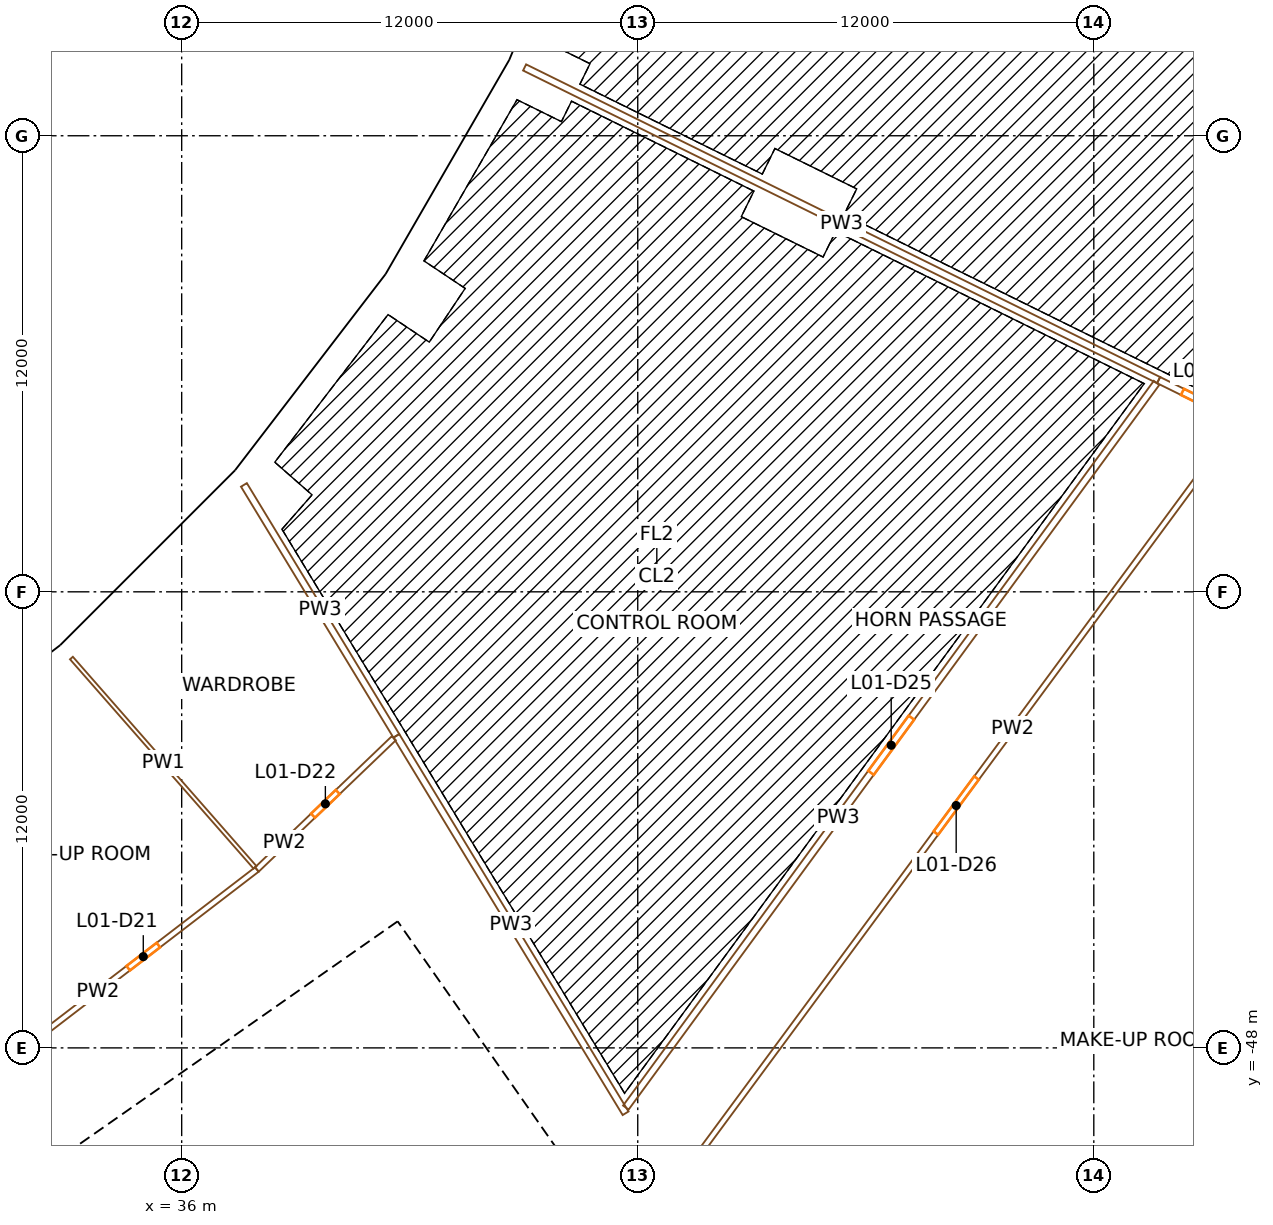
"""IFC4 building model, lengths in metres.
Left out: names, types, materials, properties, quantities, classifications, styles, units other than length and angle.
Written with IfcOpenShell. Run it as: python <this file> out.ifc"""

import sys

from ifc_helpers import new_model, si_unit, direction, frame, frame_2d, origin, origin_2d, place, context, subcontext, project, spatial, rectangle, extrude, element, fill, save


model = new_model("IFC4")
c1 = context("Model", 3, precision=1e-05, world=origin(), true_north=direction((0.0, 1.0)))
c2 = subcontext(c1, "Body", "Model", "MODEL_VIEW")
j1 = project(units=[si_unit("LENGTHUNIT", "METRE"), si_unit("PLANEANGLEUNIT", "RADIAN")], contexts=[c1])
p1 = place(None, origin())
s1 = spatial("IfcSite", under=j1, at=p1, CompositionType="ELEMENT")
p2 = place(p1, origin())
s2 = spatial("IfcBuilding", under=s1, at=p2, CompositionType="ELEMENT")
p3 = place(p2, frame((0.0, 0.0, 9.0)))
s3 = spatial("IfcBuildingStorey", under=s2, at=p3, CompositionType="ELEMENT", Elevation=9.0)
p4 = place(p3, frame((32.362, -48.433, 0.0), z_axis=(0.0, 0.0, 1.0), x_axis=(0.831469612303, 0.55557023302, 0.0)))
e1 = element("IfcColumn", 1, at=p4, inside=s3, PredefinedType="COLUMN", context=c2, shape_type="SweptSolid", body=[
    extrude(rectangle(XDim=1.4, YDim=1.8, at=origin_2d()), origin(), (0.0, 0.0, 1.0), 9.0),
])
p5 = place(p3, frame((33.462, -38.156, 0.0), z_axis=(0.0, 0.0, 1.0), x_axis=(0.751839807479, 0.6593458151, 0.0)))
e2 = element("IfcColumn", 2, at=p5, inside=s3, PredefinedType="COLUMN", context=c2, shape_type="SweptSolid", body=[
    extrude(rectangle(XDim=1.1, YDim=1.3, at=origin_2d()), origin(), (0.0, 0.0, 1.0), 9.0),
])
p6 = place(p3, frame((38.407, -43.795, 0.0), z_axis=(0.0, 0.0, 1.0), x_axis=(0.751839807479, 0.6593458151, 0.0)))
e3 = element("IfcColumn", 3, at=p6, inside=s3, PredefinedType="COLUMN", context=c2, shape_type="SweptSolid", body=[
    extrude(rectangle(XDim=1.4, YDim=1.8, at=origin_2d()), origin(), (0.0, 0.0, 1.0), 9.0),
])
p7 = place(p3, frame((38.156, -33.462, 0.0), z_axis=(0.0, 0.0, 1.0), x_axis=(0.6593458151, 0.751839807479, 0.0)))
e4 = element("IfcColumn", 4, at=p7, inside=s3, PredefinedType="COLUMN", context=c2, shape_type="SweptSolid", body=[
    extrude(rectangle(XDim=1.1, YDim=1.3, at=origin_2d()), origin(), (0.0, 0.0, 1.0), 9.0),
])
for number, where, z_axis, x_axis in (
    (5, (43.795, -38.407, 0.0), (0.0, 0.0, 1.0), (0.659, 0.752, 0.0)),
    (6, (58.456, -51.264, 0.0), (0.0, 0.0, 1.0), (0.659, 0.752, 0.0)),
):
    element("IfcColumn", number, at=place(p3, frame(where, z_axis=z_axis, x_axis=x_axis)), inside=s3, PredefinedType="COLUMN", context=c2, shape_type="SweptSolid", body=[
        extrude(rectangle(XDim=1.4, YDim=1.8, at=origin_2d()), origin(), (0.0, 0.0, 1.0), 9.0),
    ])
p8 = place(p3, frame((42.197, -28.195, 0.0), z_axis=(0.0, 0.0, 1.0), x_axis=(0.55557023302, 0.831469612303, 0.0)))
e7 = element("IfcColumn", 7, at=p8, inside=s3, PredefinedType="COLUMN", context=c2, shape_type="SweptSolid", body=[
    extrude(rectangle(XDim=1.1, YDim=1.3, at=origin_2d()), origin(), (0.0, 0.0, 1.0), 9.0),
])
p9 = place(p3, frame((48.433, -32.362, 0.0), z_axis=(0.0, 0.0, 1.0), x_axis=(0.55557023302, 0.831469612303, 0.0)))
e8 = element("IfcColumn", 8, at=p9, inside=s3, PredefinedType="COLUMN", context=c2, shape_type="SweptSolid", body=[
    extrude(rectangle(XDim=1.4, YDim=1.8, at=origin_2d()), origin(), (0.0, 0.0, 1.0), 9.0),
])
p10 = place(p3, frame((45.516, -22.446, 0.0), z_axis=(0.0, 0.0, 1.0), x_axis=(0.442288690219, 0.896872741533, 0.0)))
e9 = element("IfcColumn", 9, at=p10, inside=s3, PredefinedType="COLUMN", context=c2, shape_type="SweptSolid", body=[
    extrude(rectangle(XDim=1.1, YDim=1.3, at=origin_2d()), origin(), (0.0, 0.0, 1.0), 9.0),
])
p11 = place(p3, frame((52.243, -25.763, 0.0), z_axis=(0.0, 0.0, 1.0), x_axis=(0.442288690219, 0.896872741533, 0.0)))
e10 = element("IfcColumn", 10, at=p11, inside=s3, PredefinedType="COLUMN", context=c2, shape_type="SweptSolid", body=[
    extrude(rectangle(XDim=1.4, YDim=1.8, at=origin_2d()), origin(), (0.0, 0.0, 1.0), 9.0),
])
p12 = place(p3, frame((49.779, -57.191, 0.0), z_axis=(0.0, 0.0, 1.0), x_axis=(-0.573577477574, 0.819151315216, 0.0)))
e11 = element("IfcWall", 11, at=p12, inside=s3, PredefinedType="SHEAR", context=c2, shape_type="SweptSolid", body=[
    extrude(rectangle(XDim=14.8, YDim=0.9, at=frame_2d((7.4, 0.0))), origin(), (0.0, 0.0, 1.0), 8.6),
])
p13 = place(p12, frame((6.7, 0.0, 0.0)))
e12 = element("IfcOpeningElement", 12, at=p13, cuts=e11, PredefinedType="OPENING", context=c2, shape_type="SweptSolid", body=[
    extrude(rectangle(XDim=1.4, YDim=2.1, at=frame_2d((0.7, 1.05))), frame((0.0, 0.46, 0.0), z_axis=(0.0, -1.0, 0.0), x_axis=(1.0, 0.0, 0.0)), (0.0, 0.0, 1.0), 0.92),
])
p14 = place(p3, frame((28.854, -54.324, 0.0), z_axis=(0.0, 0.0, 1.0), x_axis=(0.819145767589, 0.573585400304, 0.0)))
e13 = element("IfcWall", 13, at=p14, inside=s3, PredefinedType="SHEAR", context=c2, shape_type="SweptSolid", body=[
    extrude(rectangle(XDim=15.045, YDim=0.9, at=frame_2d((7.523, 0.0))), origin(), (0.0, 0.0, 1.0), 8.6),
])
p15 = place(p14, frame((0.85, 0.0, 0.0)))
e14 = element("IfcOpeningElement", 14, at=p15, cuts=e13, PredefinedType="OPENING", context=c2, shape_type="SweptSolid", body=[
    extrude(rectangle(XDim=1.0, YDim=2.1, at=frame_2d((0.5, 1.05))), frame((0.0, 0.46, 0.0), z_axis=(0.0, -1.0, 0.0), x_axis=(1.0, 0.0, 0.0)), (0.0, 0.0, 1.0), 0.92),
])
p16 = place(p14, frame((3.575, 0.0, 0.0)))
e15 = element("IfcOpeningElement", 15, at=p16, cuts=e13, PredefinedType="OPENING", context=c2, shape_type="SweptSolid", body=[
    extrude(rectangle(XDim=1.0, YDim=2.1, at=frame_2d((0.5, 1.05))), frame((0.0, 0.46, 0.0), z_axis=(0.0, -1.0, 0.0), x_axis=(1.0, 0.0, 0.0)), (0.0, 0.0, 1.0), 0.92),
])
p17 = place(p14, frame((6.275, 0.0, 0.0)))
e16 = element("IfcOpeningElement", 16, at=p17, cuts=e13, PredefinedType="OPENING", context=c2, shape_type="SweptSolid", body=[
    extrude(rectangle(XDim=0.9, YDim=2.1, at=frame_2d((0.45, 1.05))), frame((0.0, 0.46, 0.0), z_axis=(0.0, -1.0, 0.0), x_axis=(1.0, 0.0, 0.0)), (0.0, 0.0, 1.0), 0.92),
])
p18 = place(p14, frame((13.495, 0.0, 0.0)))
e17 = element("IfcOpeningElement", 17, at=p18, cuts=e13, PredefinedType="OPENING", context=c2, shape_type="SweptSolid", body=[
    extrude(rectangle(XDim=1.1, YDim=2.1, at=frame_2d((0.55, 1.05))), frame((0.0, 0.46, 0.0), z_axis=(0.0, -1.0, 0.0), x_axis=(1.0, 0.0, 0.0)), (0.0, 0.0, 1.0), 0.92),
])
p19 = place(p3, frame((43.204, -60.696, 0.0), z_axis=(0.0, 0.0, 1.0), x_axis=(-0.573571992966, 0.819155155563, 0.0)))
e18 = element("IfcWall", 18, at=p19, inside=s3, PredefinedType="SOLIDWALL", context=c2, shape_type="SweptSolid", body=[
    extrude(rectangle(XDim=13.0, YDim=0.3, at=frame_2d((6.5, 0.0))), origin(), (0.0, 0.0, 1.0), 8.6),
])
p20 = place(p3, frame((37.936, -52.91, 0.0), z_axis=(0.0, 0.0, 1.0), x_axis=(0.819147518138, 0.57358290031, 0.0)))
e19 = element("IfcWall", 19, at=p20, inside=s3, PredefinedType="SOLIDWALL", context=c2, shape_type="SweptSolid", body=[
    extrude(rectangle(XDim=6.795, YDim=0.3, at=frame_2d((3.398, 0.0))), origin(), (0.0, 0.0, 1.0), 8.6),
])
p21 = place(p20, frame((5.32, 0.0, 0.0)))
e20 = element("IfcOpeningElement", 20, at=p21, cuts=e19, PredefinedType="OPENING", context=c2, shape_type="SweptSolid", body=[
    extrude(rectangle(XDim=1.1, YDim=2.1, at=frame_2d((0.55, 1.05))), frame((0.0, 0.16, 0.0), z_axis=(0.0, -1.0, 0.0), x_axis=(1.0, 0.0, 0.0)), (0.0, 0.0, 1.0), 0.32),
])
p22 = place(p3, frame((41.3, -47.96, 0.0), z_axis=(0.0, 0.0, 1.0), x_axis=(0.573495128918, -0.819208970354, 0.0)))
e21 = element("IfcWall", 21, at=p22, inside=s3, PredefinedType="SOLIDWALL", context=c2, shape_type="SweptSolid", body=[
    extrude(rectangle(XDim=0.5, YDim=0.3, at=frame_2d((0.25, 0.0))), origin(), (0.0, 0.0, 1.0), 4.3),
])
p23 = place(p3, frame((32.975, -37.555, 0.0), z_axis=(0.0, 0.0, 1.0), x_axis=(-0.793338838284, -0.608780327927, 0.0)))
e22 = element("IfcWall", 22, at=p23, inside=s3, PredefinedType="SOLIDWALL", context=c2, shape_type="SweptSolid", body=[
    extrude(rectangle(XDim=6.597, YDim=0.45, at=frame_2d((3.298, 0.0))), origin(), (0.0, 0.0, 1.0), 7.7),
])
p24 = place(p3, frame((37.532, -32.993, 0.0), z_axis=(0.0, 0.0, 1.0), x_axis=(-0.707106781187, -0.707106781187, 0.0)))
e23 = element("IfcWall", 23, at=p24, inside=s3, PredefinedType="SOLIDWALL", context=c2, shape_type="SweptSolid", body=[
    extrude(rectangle(XDim=6.419, YDim=0.45, at=frame_2d((3.209, 0.0))), origin(), (0.0, 0.0, 1.0), 7.7),
])
p25 = place(p3, frame((41.571, -27.741, 0.0), z_axis=(0.0, 0.0, 1.0), x_axis=(-0.608780327927, -0.793338838284, 0.0)))
e24 = element("IfcWall", 24, at=p25, inside=s3, PredefinedType="SOLIDWALL", context=c2, shape_type="SweptSolid", body=[
    extrude(rectangle(XDim=6.597, YDim=0.45, at=frame_2d((3.298, 0.0))), origin(), (0.0, 0.0, 1.0), 7.7),
])
p26 = place(p3, frame((44.792, -22.155, 0.0), z_axis=(0.0, 0.0, 1.0), x_axis=(-0.50000447882, -0.866022817921, 0.0)))
e25 = element("IfcWall", 25, at=p26, inside=s3, PredefinedType="SOLIDWALL", context=c2, shape_type="SweptSolid", body=[
    extrude(rectangle(XDim=6.419, YDim=0.45, at=frame_2d((3.21, 0.0))), origin(), (0.0, 0.0, 1.0), 7.7),
])
p27 = place(p3, frame((47.327, -16.056, 0.0), z_axis=(0.0, 0.0, 1.0), x_axis=(-0.382692796414, -0.92387565374, 0.0)))
e26 = element("IfcWall", 26, at=p27, inside=s3, PredefinedType="SOLIDWALL", context=c2, shape_type="SweptSolid", body=[
    extrude(rectangle(XDim=6.576, YDim=0.45, at=frame_2d((3.288, 0.0))), origin(), (0.0, 0.0, 1.0), 7.7),
])
p28 = place(p3, frame((32.001, -47.893, 0.0), z_axis=(0.0, 0.0, 1.0), x_axis=(0.793357001845, 0.60875665715, 0.0)))
e27 = element("IfcWall", 27, at=p28, inside=s3, PredefinedType="PARTITIONING", context=c2, shape_type="SweptSolid", body=[
    extrude(rectangle(XDim=7.534, YDim=0.15, at=frame_2d((3.767, 0.0))), origin(), (0.0, 0.0, 1.0), 7.6),
])
p29 = place(p28, frame((3.267, 0.0, 0.0)))
e28 = element("IfcOpeningElement", 28, at=p29, cuts=e27, PredefinedType="OPENING", context=c2, shape_type="SweptSolid", body=[
    extrude(rectangle(XDim=1.0, YDim=2.1, at=frame_2d((0.5, 1.05))), frame((0.0, 0.085, 0.0), z_axis=(0.0, -1.0, 0.0), x_axis=(1.0, 0.0, 0.0)), (0.0, 0.0, 1.0), 0.17),
])
p30 = place(p3, frame((33.099, -37.742, 0.0), z_axis=(0.0, 0.0, 1.0), x_axis=(0.659365444899, -0.751822592154, 0.0)))
e29 = element("IfcWall", 29, at=p30, inside=s3, PredefinedType="PARTITIONING", context=c2, shape_type="SweptSolid", body=[
    extrude(rectangle(XDim=7.325, YDim=0.1, at=frame_2d((3.663, 0.0))), origin(), (0.0, 0.0, 1.0), 7.6),
])
p31 = place(p3, frame((37.638, -33.187, 0.0), z_axis=(0.0, 0.0, 1.0), x_axis=(0.519163683086, -0.854674833, 0.0)))
e30 = element("IfcWall", 30, at=p31, inside=s3, PredefinedType="PARTITIONING", context=c2, shape_type="SweptSolid", body=[
    extrude(rectangle(XDim=7.725, YDim=0.18, at=frame_2d((3.862, 0.0))), origin(), (0.0, 0.0, 1.0), 7.6),
])
p32 = place(p3, frame((37.978, -43.306, 0.0), z_axis=(0.0, 0.0, 1.0), x_axis=(0.72203095095, 0.691860756128, 0.0)))
e31 = element("IfcWall", 31, at=p32, inside=s3, PredefinedType="PARTITIONING", context=c2, shape_type="SweptSolid", body=[
    extrude(rectangle(XDim=4.993, YDim=0.15, at=frame_2d((2.497, 0.0))), origin(), (0.0, 0.0, 1.0), 7.6),
])
p33 = place(p32, frame((2.046, 0.0, 0.0)))
e32 = element("IfcOpeningElement", 32, at=p33, cuts=e31, PredefinedType="OPENING", context=c2, shape_type="SweptSolid", body=[
    extrude(rectangle(XDim=0.9, YDim=2.1, at=frame_2d((0.45, 1.05))), frame((0.0, 0.085, 0.0), z_axis=(0.0, -1.0, 0.0), x_axis=(1.0, 0.0, 0.0)), (0.0, 0.0, 1.0), 0.17),
])
p34 = place(p3, frame((41.648, -39.789, 0.0), z_axis=(0.0, 0.0, 1.0), x_axis=(0.519150836569, -0.854682636357, 0.0)))
e33 = element("IfcWall", 33, at=p34, inside=s3, PredefinedType="PARTITIONING", context=c2, shape_type="SweptSolid", body=[
    extrude(rectangle(XDim=11.619, YDim=0.18, at=frame_2d((5.81, 0.0))), origin(), (0.0, 0.0, 1.0), 7.6),
])
p35 = place(p3, frame((47.687, -49.571, 0.0), z_axis=(0.0, 0.0, 1.0), x_axis=(0.590834674168, 0.806792654776, 0.0)))
e34 = element("IfcWall", 34, at=p35, inside=s3, PredefinedType="PARTITIONING", context=c2, shape_type="SweptSolid", body=[
    extrude(rectangle(XDim=23.635, YDim=0.18, at=frame_2d((11.818, 0.0))), origin(), (0.0, 0.0, 1.0), 7.6),
])
p36 = place(p35, frame((10.918, 0.0, 0.0)))
e35 = element("IfcOpeningElement", 35, at=p36, cuts=e34, PredefinedType="OPENING", context=c2, shape_type="SweptSolid", body=[
    extrude(rectangle(XDim=1.8, YDim=2.1, at=frame_2d((0.9, 1.05))), frame((0.0, 0.1, 0.0), z_axis=(0.0, -1.0, 0.0), x_axis=(1.0, 0.0, 0.0)), (0.0, 0.0, 1.0), 0.2),
])
p37 = place(p3, frame((63.804, -31.563, 0.0), z_axis=(0.0, 0.0, 1.0), x_axis=(-0.593865237906, -0.804564527683, 0.0)))
e36 = element("IfcWall", 36, at=p37, inside=s3, PredefinedType="PARTITIONING", context=c2, shape_type="SweptSolid", body=[
    extrude(rectangle(XDim=25.006, YDim=0.15, at=frame_2d((12.503, 0.0))), origin(), (0.0, 0.0, 1.0), 7.6),
])
p38 = place(p37, frame((11.603, 0.0, 0.0)))
e37 = element("IfcOpeningElement", 37, at=p38, cuts=e36, PredefinedType="OPENING", context=c2, shape_type="SweptSolid", body=[
    extrude(rectangle(XDim=1.8, YDim=2.1, at=frame_2d((0.9, 1.05))), frame((0.0, 0.085, 0.0), z_axis=(0.0, -1.0, 0.0), x_axis=(1.0, 0.0, 0.0)), (0.0, 0.0, 1.0), 0.17),
])
p39 = place(p3, frame((61.705, -30.429, 0.0), z_axis=(0.0, 0.0, 1.0), x_axis=(-0.896873438268, 0.442287277377, 0.0)))
e38 = element("IfcWall", 38, at=p39, inside=s3, PredefinedType="PARTITIONING", context=c2, shape_type="SweptSolid", body=[
    extrude(rectangle(XDim=18.6, YDim=0.18, at=frame_2d((9.3, 0.0))), origin(), (0.0, 0.0, 1.0), 7.6),
])
p40 = place(p3, frame((61.705, -30.429, 0.0), z_axis=(0.0, 0.0, 1.0), x_axis=(0.896875292523, -0.442283517284, 0.0)))
e39 = element("IfcWall", 39, at=p40, inside=s3, PredefinedType="PARTITIONING", context=c2, shape_type="SweptSolid", body=[
    extrude(rectangle(XDim=2.4, YDim=0.18, at=frame_2d((1.2, 0.0))), origin(), (0.0, 0.0, 1.0), 7.6),
])
p41 = place(p40, frame((0.7, 0.0, 0.0)))
e40 = element("IfcOpeningElement", 40, at=p41, cuts=e39, PredefinedType="OPENING", context=c2, shape_type="SweptSolid", body=[
    extrude(rectangle(XDim=1.0, YDim=2.1, at=frame_2d((0.5, 1.05))), frame((0.0, 0.1, 0.0), z_axis=(0.0, -1.0, 0.0), x_axis=(1.0, 0.0, 0.0)), (0.0, 0.0, 1.0), 0.2),
])
p42 = place(p17, origin())
e41 = element("IfcDoor", 41, at=p42, inside=s3, OperationType="SINGLE_SWING_RIGHT", PredefinedType="DOOR", context=c2, shape_type="SweptSolid", body=[
    extrude(rectangle(XDim=0.9, YDim=2.1, at=frame_2d((0.45, 1.05))), frame((0.0, 0.025, 0.0), z_axis=(0.0, -1.0, 0.0), x_axis=(1.0, 0.0, 0.0)), (0.0, 0.0, 1.0), 0.05),
])
fill(e16, e41)
p43 = place(p13, origin())
e42 = element("IfcDoor", 42, at=p43, inside=s3, OperationType="DOUBLE_DOOR_SINGLE_SWING", PredefinedType="DOOR", context=c2, shape_type="SweptSolid", body=[
    extrude(rectangle(XDim=1.4, YDim=2.1, at=frame_2d((0.7, 1.05))), frame((0.0, 0.025, 0.0), z_axis=(0.0, -1.0, 0.0), x_axis=(1.0, 0.0, 0.0)), (0.0, 0.0, 1.0), 0.05),
])
fill(e12, e42)
p44 = place(p18, origin())
e43 = element("IfcDoor", 43, at=p44, inside=s3, OperationType="SINGLE_SWING_RIGHT", PredefinedType="DOOR", context=c2, shape_type="SweptSolid", body=[
    extrude(rectangle(XDim=1.1, YDim=2.1, at=frame_2d((0.55, 1.05))), frame((0.0, 0.025, 0.0), z_axis=(0.0, -1.0, 0.0), x_axis=(1.0, 0.0, 0.0)), (0.0, 0.0, 1.0), 0.05),
])
fill(e17, e43)
p45 = place(p21, origin())
e44 = element("IfcDoor", 44, at=p45, inside=s3, OperationType="SINGLE_SWING_RIGHT", PredefinedType="DOOR", context=c2, shape_type="SweptSolid", body=[
    extrude(rectangle(XDim=1.1, YDim=2.1, at=frame_2d((0.55, 1.05))), frame((0.0, 0.025, 0.0), z_axis=(0.0, -1.0, 0.0), x_axis=(1.0, 0.0, 0.0)), (0.0, 0.0, 1.0), 0.05),
])
fill(e20, e44)
p46 = place(p29, origin())
e45 = element("IfcDoor", 45, at=p46, inside=s3, OperationType="SINGLE_SWING_RIGHT", PredefinedType="DOOR", context=c2, shape_type="SweptSolid", body=[
    extrude(rectangle(XDim=1.0, YDim=2.1, at=frame_2d((0.5, 1.05))), frame((0.0, 0.025, 0.0), z_axis=(0.0, -1.0, 0.0), x_axis=(1.0, 0.0, 0.0)), (0.0, 0.0, 1.0), 0.05),
])
fill(e28, e45)
p47 = place(p33, origin())
e46 = element("IfcDoor", 46, at=p47, inside=s3, OperationType="SINGLE_SWING_RIGHT", PredefinedType="DOOR", context=c2, shape_type="SweptSolid", body=[
    extrude(rectangle(XDim=0.9, YDim=2.1, at=frame_2d((0.45, 1.05))), frame((0.0, 0.025, 0.0), z_axis=(0.0, -1.0, 0.0), x_axis=(1.0, 0.0, 0.0)), (0.0, 0.0, 1.0), 0.05),
])
fill(e32, e46)
p48 = place(p36, origin())
e47 = element("IfcDoor", 47, at=p48, inside=s3, OperationType="DOUBLE_DOOR_SINGLE_SWING", PredefinedType="DOOR", context=c2, shape_type="SweptSolid", body=[
    extrude(rectangle(XDim=1.8, YDim=2.1, at=frame_2d((0.9, 1.05))), frame((0.0, 0.025, 0.0), z_axis=(0.0, -1.0, 0.0), x_axis=(1.0, 0.0, 0.0)), (0.0, 0.0, 1.0), 0.05),
])
fill(e35, e47)
p49 = place(p38, origin())
e48 = element("IfcDoor", 48, at=p49, inside=s3, OperationType="DOUBLE_DOOR_SINGLE_SWING", PredefinedType="DOOR", context=c2, shape_type="SweptSolid", body=[
    extrude(rectangle(XDim=1.8, YDim=2.1, at=frame_2d((0.9, 1.05))), frame((0.0, 0.025, 0.0), z_axis=(0.0, -1.0, 0.0), x_axis=(1.0, 0.0, 0.0)), (0.0, 0.0, 1.0), 0.05),
])
fill(e37, e48)
p50 = place(p41, origin())
e49 = element("IfcDoor", 49, at=p50, inside=s3, OperationType="SINGLE_SWING_RIGHT", PredefinedType="DOOR", context=c2, shape_type="SweptSolid", body=[
    extrude(rectangle(XDim=1.0, YDim=2.1, at=frame_2d((0.5, 1.05))), frame((0.0, 0.025, 0.0), z_axis=(0.0, -1.0, 0.0), x_axis=(1.0, 0.0, 0.0)), (0.0, 0.0, 1.0), 0.05),
])
fill(e40, e49)
save(model, sys.argv[1])
